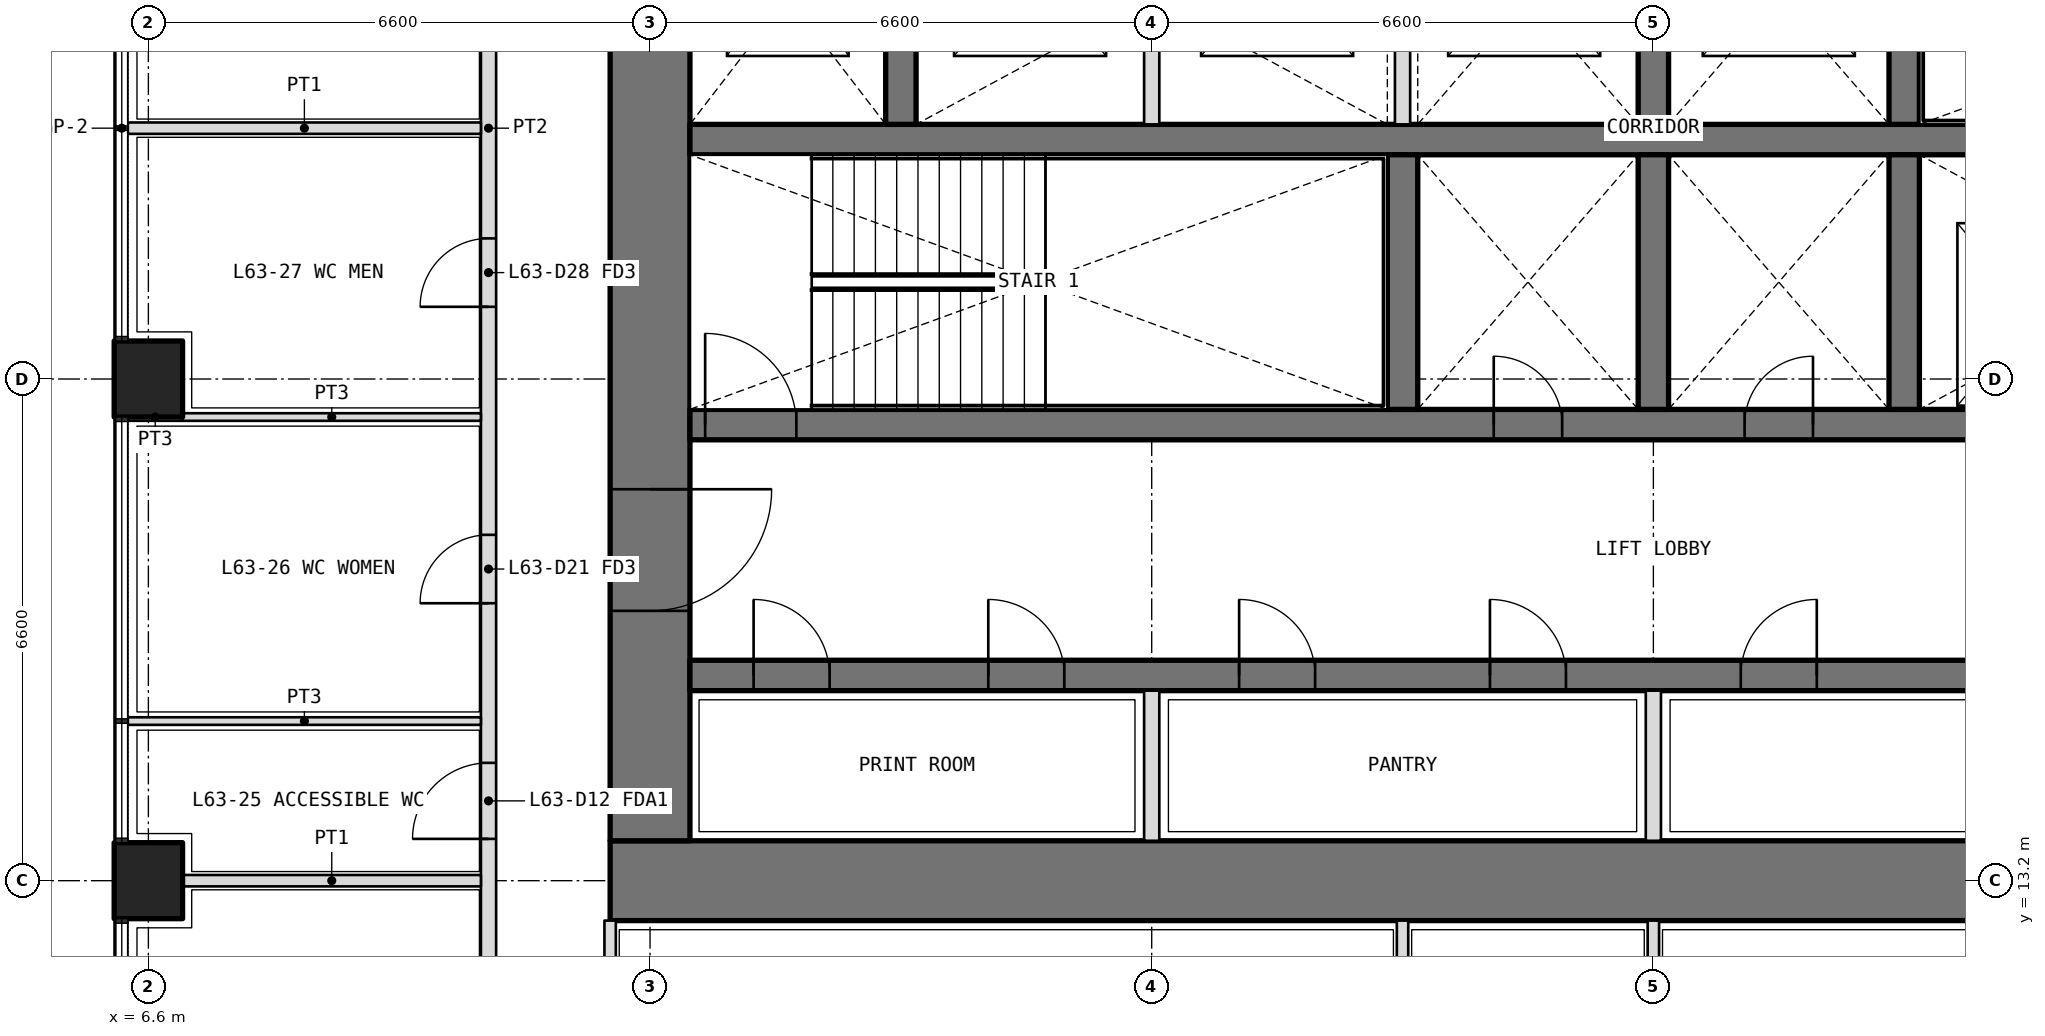
"""IFC4 building model, lengths in metres.
Left out: names, types, materials, properties, quantities, classifications, styles, units other than length and angle.
Written with IfcOpenShell. Run it as: python <this file> out.ifc"""

import sys

from ifc_helpers import new_model, si_unit, direction, frame, frame_2d, origin, origin_2d, place, context, subcontext, project, spatial, rectangle, extrude, element, fill, save


model = new_model("IFC4")
c1 = context("Model", 3, precision=1e-05, world=origin(), true_north=direction((0.0, 1.0)))
c2 = subcontext(c1, "Body", "Model", "MODEL_VIEW")
j1 = project(units=[si_unit("LENGTHUNIT", "METRE"), si_unit("PLANEANGLEUNIT", "RADIAN")], contexts=[c1])
p1 = place(None, origin())
s1 = spatial("IfcSite", under=j1, at=p1, CompositionType="ELEMENT")
p2 = place(p1, origin())
s2 = spatial("IfcBuilding", under=s1, at=p2, CompositionType="ELEMENT")
p3 = place(p2, frame((0.0, 0.0, 275.4)))
s3 = spatial("IfcBuildingStorey", under=s2, at=p3, CompositionType="ELEMENT", Elevation=275.4)
for number, where, z_axis, x_axis in (
    (1, (6.6, 13.2, 0.0), (0.0, 0.0, 1.0), (0.0, 1.0, 0.0)),
    (2, (6.6, 19.8, 0.0), (0.0, 0.0, 1.0), (0.0, 1.0, 0.0)),
):
    element("IfcColumn", number, at=place(p3, frame(where, z_axis=z_axis, x_axis=x_axis)), inside=s3, PredefinedType="COLUMN", context=c2, shape_type="SweptSolid", body=[
        extrude(rectangle(XDim=1.0, YDim=0.9, at=origin_2d()), origin(), (0.0, 0.0, 1.0), 4.2),
    ])
p4 = place(p3, frame((12.675, 13.2, 0.0), z_axis=(0.0, 0.0, 1.0), x_axis=(1.0, 0.0, 0.0)))
e3 = element("IfcWall", 3, at=p4, inside=s3, PredefinedType="SHEAR", context=c2, shape_type="SweptSolid", body=[
    extrude(rectangle(XDim=27.45, YDim=1.05, at=frame_2d((13.725, 0.0))), origin(), (0.0, 0.0, 1.0), 4.2),
])
p5 = place(p3, frame((13.2, 32.475, 0.0), z_axis=(0.0, 0.0, 1.0), x_axis=(0.0, -1.0, 0.0)))
e4 = element("IfcWall", 4, at=p5, inside=s3, PredefinedType="SHEAR", context=c2, shape_type="SweptSolid", body=[
    extrude(rectangle(XDim=18.75, YDim=1.05, at=frame_2d((9.375, 0.0))), origin(), (0.0, 0.0, 1.0), 4.2),
])
p6 = place(p5, frame((14.125, 0.0, 0.0)))
e5 = element("IfcOpeningElement", 5, at=p6, cuts=e4, PredefinedType="OPENING", context=c2, shape_type="SweptSolid", body=[
    extrude(rectangle(XDim=1.6, YDim=2.1, at=frame_2d((0.8, 1.05))), frame((0.0, 0.535, 0.0), z_axis=(0.0, -1.0, 0.0), x_axis=(1.0, 0.0, 0.0)), (0.0, 0.0, 1.0), 1.07),
])
p7 = place(p5, frame((3.325, 0.0, 0.0)))
e6 = element("IfcOpeningElement", 6, at=p7, cuts=e4, PredefinedType="OPENING", context=c2, shape_type="SweptSolid", body=[
    extrude(rectangle(XDim=1.6, YDim=2.1, at=frame_2d((0.8, 1.05))), frame((0.0, 0.535, 0.0), z_axis=(0.0, -1.0, 0.0), x_axis=(1.0, 0.0, 0.0)), (0.0, 0.0, 1.0), 1.07),
])
p8 = place(p3, frame((13.725, 15.9, 0.0), z_axis=(0.0, 0.0, 1.0), x_axis=(1.0, 0.0, 0.0)))
e7 = element("IfcWall", 7, at=p8, inside=s3, PredefinedType="SHEAR", context=c2, shape_type="SweptSolid", body=[
    extrude(rectangle(XDim=25.35, YDim=0.4, at=frame_2d((12.675, 0.0))), origin(), (0.0, 0.0, 1.0), 4.2),
])
p9 = place(p8, frame((0.837, 0.0, 0.0)))
e8 = element("IfcOpeningElement", 8, at=p9, cuts=e7, PredefinedType="OPENING", context=c2, shape_type="SweptSolid", body=[
    extrude(rectangle(XDim=1.0, YDim=2.1, at=frame_2d((0.5, 1.05))), frame((0.0, 0.21, 0.0), z_axis=(0.0, -1.0, 0.0), x_axis=(1.0, 0.0, 0.0)), (0.0, 0.0, 1.0), 0.42),
])
p10 = place(p8, frame((3.925, 0.0, 0.0)))
e9 = element("IfcOpeningElement", 9, at=p10, cuts=e7, PredefinedType="OPENING", context=c2, shape_type="SweptSolid", body=[
    extrude(rectangle(XDim=1.0, YDim=2.1, at=frame_2d((0.5, 1.05))), frame((0.0, 0.21, 0.0), z_axis=(0.0, -1.0, 0.0), x_axis=(1.0, 0.0, 0.0)), (0.0, 0.0, 1.0), 0.42),
])
p11 = place(p8, frame((7.225, 0.0, 0.0)))
e10 = element("IfcOpeningElement", 10, at=p11, cuts=e7, PredefinedType="OPENING", context=c2, shape_type="SweptSolid", body=[
    extrude(rectangle(XDim=1.0, YDim=2.1, at=frame_2d((0.5, 1.05))), frame((0.0, 0.21, 0.0), z_axis=(0.0, -1.0, 0.0), x_axis=(1.0, 0.0, 0.0)), (0.0, 0.0, 1.0), 0.42),
])
p12 = place(p8, frame((10.525, 0.0, 0.0)))
e11 = element("IfcOpeningElement", 11, at=p12, cuts=e7, PredefinedType="OPENING", context=c2, shape_type="SweptSolid", body=[
    extrude(rectangle(XDim=1.0, YDim=2.1, at=frame_2d((0.5, 1.05))), frame((0.0, 0.21, 0.0), z_axis=(0.0, -1.0, 0.0), x_axis=(1.0, 0.0, 0.0)), (0.0, 0.0, 1.0), 0.42),
])
p13 = place(p8, frame((13.825, 0.0, 0.0)))
e12 = element("IfcOpeningElement", 12, at=p13, cuts=e7, PredefinedType="OPENING", context=c2, shape_type="SweptSolid", body=[
    extrude(rectangle(XDim=1.0, YDim=2.1, at=frame_2d((0.5, 1.05))), frame((0.0, 0.21, 0.0), z_axis=(0.0, -1.0, 0.0), x_axis=(1.0, 0.0, 0.0)), (0.0, 0.0, 1.0), 0.42),
])
p14 = place(p8, frame((17.125, 0.0, 0.0)))
e13 = element("IfcOpeningElement", 13, at=p14, cuts=e7, PredefinedType="OPENING", context=c2, shape_type="SweptSolid", body=[
    extrude(rectangle(XDim=1.0, YDim=2.1, at=frame_2d((0.5, 1.05))), frame((0.0, 0.21, 0.0), z_axis=(0.0, -1.0, 0.0), x_axis=(1.0, 0.0, 0.0)), (0.0, 0.0, 1.0), 0.42),
])
p15 = place(p8, frame((20.425, 0.0, 0.0)))
e14 = element("IfcOpeningElement", 14, at=p15, cuts=e7, PredefinedType="OPENING", context=c2, shape_type="SweptSolid", body=[
    extrude(rectangle(XDim=1.0, YDim=2.1, at=frame_2d((0.5, 1.05))), frame((0.0, 0.21, 0.0), z_axis=(0.0, -1.0, 0.0), x_axis=(1.0, 0.0, 0.0)), (0.0, 0.0, 1.0), 0.42),
])
p16 = place(p8, frame((23.512, 0.0, 0.0)))
e15 = element("IfcOpeningElement", 15, at=p16, cuts=e7, PredefinedType="OPENING", context=c2, shape_type="SweptSolid", body=[
    extrude(rectangle(XDim=1.0, YDim=2.1, at=frame_2d((0.5, 1.05))), frame((0.0, 0.21, 0.0), z_axis=(0.0, -1.0, 0.0), x_axis=(1.0, 0.0, 0.0)), (0.0, 0.0, 1.0), 0.42),
])
p17 = place(p3, frame((13.725, 19.2, 0.0), z_axis=(0.0, 0.0, 1.0), x_axis=(1.0, 0.0, 0.0)))
e16 = element("IfcWall", 16, at=p17, inside=s3, PredefinedType="SHEAR", context=c2, shape_type="SweptSolid", body=[
    extrude(rectangle(XDim=25.35, YDim=0.4, at=frame_2d((12.675, 0.0))), origin(), (0.0, 0.0, 1.0), 4.2),
])
p18 = place(p17, frame((10.575, 0.0, 0.0)))
e17 = element("IfcOpeningElement", 17, at=p18, cuts=e16, PredefinedType="OPENING", context=c2, shape_type="SweptSolid", body=[
    extrude(rectangle(XDim=0.9, YDim=2.1, at=frame_2d((0.45, 1.05))), frame((0.0, 0.21, 0.0), z_axis=(0.0, -1.0, 0.0), x_axis=(1.0, 0.0, 0.0)), (0.0, 0.0, 1.0), 0.42),
])
p19 = place(p17, frame((13.875, 0.0, 0.0)))
e18 = element("IfcOpeningElement", 18, at=p19, cuts=e16, PredefinedType="OPENING", context=c2, shape_type="SweptSolid", body=[
    extrude(rectangle(XDim=0.9, YDim=2.1, at=frame_2d((0.45, 1.05))), frame((0.0, 0.21, 0.0), z_axis=(0.0, -1.0, 0.0), x_axis=(1.0, 0.0, 0.0)), (0.0, 0.0, 1.0), 0.42),
])
p20 = place(p17, frame((0.2, 0.0, 0.0)))
e19 = element("IfcOpeningElement", 19, at=p20, cuts=e16, PredefinedType="OPENING", context=c2, shape_type="SweptSolid", body=[
    extrude(rectangle(XDim=1.2, YDim=2.1, at=frame_2d((0.6, 1.05))), frame((0.0, 0.21, 0.0), z_axis=(0.0, -1.0, 0.0), x_axis=(1.0, 0.0, 0.0)), (0.0, 0.0, 1.0), 0.42),
])
p21 = place(p17, frame((23.512, 0.0, 0.0)))
e20 = element("IfcOpeningElement", 20, at=p21, cuts=e16, PredefinedType="OPENING", context=c2, shape_type="SweptSolid", body=[
    extrude(rectangle(XDim=1.1, YDim=2.1, at=frame_2d((0.55, 1.05))), frame((0.0, 0.21, 0.0), z_axis=(0.0, -1.0, 0.0), x_axis=(1.0, 0.0, 0.0)), (0.0, 0.0, 1.0), 0.42),
])
p22 = place(p17, frame((17.125, 0.0, 0.0)))
e21 = element("IfcOpeningElement", 21, at=p22, cuts=e16, PredefinedType="OPENING", context=c2, shape_type="SweptSolid", body=[
    extrude(rectangle(XDim=1.1, YDim=2.1, at=frame_2d((0.55, 1.05))), frame((0.0, 0.21, 0.0), z_axis=(0.0, -1.0, 0.0), x_axis=(1.0, 0.0, 0.0)), (0.0, 0.0, 1.0), 0.42),
])
p23 = place(p17, frame((20.325, 0.0, 0.0)))
e22 = element("IfcOpeningElement", 22, at=p23, cuts=e16, PredefinedType="OPENING", context=c2, shape_type="SweptSolid", body=[
    extrude(rectangle(XDim=1.1, YDim=2.1, at=frame_2d((0.55, 1.05))), frame((0.0, 0.21, 0.0), z_axis=(0.0, -1.0, 0.0), x_axis=(1.0, 0.0, 0.0)), (0.0, 0.0, 1.0), 0.42),
])
p24 = place(p3, frame((13.725, 22.95, 0.0), z_axis=(0.0, 0.0, 1.0), x_axis=(1.0, 0.0, 0.0)))
e23 = element("IfcWall", 23, at=p24, inside=s3, PredefinedType="SHEAR", context=c2, shape_type="SweptSolid", body=[
    extrude(rectangle(XDim=25.35, YDim=0.4, at=frame_2d((12.675, 0.0))), origin(), (0.0, 0.0, 1.0), 4.2),
])
for number, where, z_axis, x_axis in (
    (24, (23.1, 19.4, 0.0), (0.0, 0.0, 1.0), (0.0, 1.0, 0.0)),
    (25, (26.4, 19.4, 0.0), (0.0, 0.0, 1.0), (0.0, 1.0, 0.0)),
    (26, (29.7, 19.4, 0.0), (0.0, 0.0, 1.0), (0.0, 1.0, 0.0)),
    (27, (16.5, 23.15, 0.0), (0.0, 0.0, 1.0), (0.0, 1.0, 0.0)),
    (28, (26.4, 23.15, 0.0), (0.0, 0.0, 1.0), (0.0, 1.0, 0.0)),
    (29, (29.7, 23.15, 0.0), (0.0, 0.0, 1.0), (0.0, 1.0, 0.0)),
):
    element("IfcWall", number, at=place(p3, frame(where, z_axis=z_axis, x_axis=x_axis)), inside=s3, PredefinedType="SHEAR", context=c2, shape_type="SweptSolid", body=[
        extrude(rectangle(XDim=3.35, YDim=0.4, at=frame_2d((1.675, 0.0))), origin(), (0.0, 0.0, 1.0), 4.2),
    ])
for number, where, z_axis, x_axis in (
    (30, (19.8, 13.725, 0.0), (0.0, 0.0, 1.0), (0.0, 1.0, 0.0)),
    (31, (26.4, 13.725, 0.0), (0.0, 0.0, 1.0), (0.0, 1.0, 0.0)),
):
    element("IfcWall", number, at=place(p3, frame(where, z_axis=z_axis, x_axis=x_axis)), inside=s3, PredefinedType="PARTITIONING", context=c2, shape_type="SweptSolid", body=[
        extrude(rectangle(XDim=1.975, YDim=0.2, at=frame_2d((0.987, 0.0))), origin(), (0.0, 0.0, 1.0), 4.2),
    ])
for number, where, z_axis, x_axis in (
    (32, (19.8, 23.15, 0.0), (0.0, 0.0, 1.0), (0.0, 1.0, 0.0)),
    (33, (23.1, 23.15, 0.0), (0.0, 0.0, 1.0), (0.0, 1.0, 0.0)),
):
    element("IfcWall", number, at=place(p3, frame(where, z_axis=z_axis, x_axis=x_axis)), inside=s3, PredefinedType="PARTITIONING", context=c2, shape_type="SweptSolid", body=[
        extrude(rectangle(XDim=3.35, YDim=0.2, at=frame_2d((1.675, 0.0))), origin(), (0.0, 0.0, 1.0), 4.2),
    ])
p25 = place(p3, frame((12.675, 12.675, 0.0), z_axis=(0.0, 0.0, 1.0), x_axis=(0.0, -1.0, 0.0)))
e34 = element("IfcWall", 34, at=p25, inside=s3, PredefinedType="PARTITIONING", context=c2, shape_type="SweptSolid", body=[
    extrude(rectangle(XDim=3.675, YDim=0.15, at=frame_2d((1.837, 0.0))), origin(), (0.0, 0.0, 1.0), 3.0),
])
p26 = place(p3, frame((23.1, 12.675, 0.0), z_axis=(0.0, 0.0, 1.0), x_axis=(0.0, -1.0, 0.0)))
e35 = element("IfcWall", 35, at=p26, inside=s3, PredefinedType="PARTITIONING", context=c2, shape_type="SweptSolid", body=[
    extrude(rectangle(XDim=3.675, YDim=0.15, at=frame_2d((1.837, 0.0))), origin(), (0.0, 0.0, 1.0), 3.9),
])
p27 = place(p3, frame((26.4, 12.675, 0.0), z_axis=(0.0, 0.0, 1.0), x_axis=(0.0, -1.0, 0.0)))
e36 = element("IfcWall", 36, at=p27, inside=s3, PredefinedType="PARTITIONING", context=c2, shape_type="SweptSolid", body=[
    extrude(rectangle(XDim=3.675, YDim=0.15, at=frame_2d((1.837, 0.0))), origin(), (0.0, 0.0, 1.0), 3.0),
])
p28 = place(p3, frame((11.075, 7.4, 0.0), z_axis=(0.0, 0.0, 1.0), x_axis=(0.0, 1.0, 0.0)))
e37 = element("IfcWall", 37, at=p28, inside=s3, PredefinedType="PARTITIONING", context=c2, shape_type="SweptSolid", body=[
    extrude(rectangle(XDim=31.4, YDim=0.2, at=frame_2d((15.7, 0.0))), origin(), (0.0, 0.0, 1.0), 3.0),
])
p29 = place(p28, frame((2.35, 0.0, 0.0)))
e38 = element("IfcOpeningElement", 38, at=p29, cuts=e37, PredefinedType="OPENING", context=c2, shape_type="SweptSolid", body=[
    extrude(rectangle(XDim=1.0, YDim=2.1, at=frame_2d((0.5, 1.05))), frame((0.0, 0.11, 0.0), z_axis=(0.0, -1.0, 0.0), x_axis=(1.0, 0.0, 0.0)), (0.0, 0.0, 1.0), 0.22),
])
p30 = place(p28, frame((6.35, 0.0, 0.0)))
e39 = element("IfcOpeningElement", 39, at=p30, cuts=e37, PredefinedType="OPENING", context=c2, shape_type="SweptSolid", body=[
    extrude(rectangle(XDim=1.0, YDim=2.1, at=frame_2d((0.5, 1.05))), frame((0.0, 0.11, 0.0), z_axis=(0.0, -1.0, 0.0), x_axis=(1.0, 0.0, 0.0)), (0.0, 0.0, 1.0), 0.22),
])
p31 = place(p28, frame((9.45, 0.0, 0.0)))
e40 = element("IfcOpeningElement", 40, at=p31, cuts=e37, PredefinedType="OPENING", context=c2, shape_type="SweptSolid", body=[
    extrude(rectangle(XDim=0.9, YDim=2.1, at=frame_2d((0.45, 1.05))), frame((0.0, 0.11, 0.0), z_axis=(0.0, -1.0, 0.0), x_axis=(1.0, 0.0, 0.0)), (0.0, 0.0, 1.0), 0.22),
])
p32 = place(p28, frame((13.35, 0.0, 0.0)))
e41 = element("IfcOpeningElement", 41, at=p32, cuts=e37, PredefinedType="OPENING", context=c2, shape_type="SweptSolid", body=[
    extrude(rectangle(XDim=0.9, YDim=2.1, at=frame_2d((0.45, 1.05))), frame((0.0, 0.11, 0.0), z_axis=(0.0, -1.0, 0.0), x_axis=(1.0, 0.0, 0.0)), (0.0, 0.0, 1.0), 0.22),
])
p33 = place(p28, frame((23.1, 0.0, 0.0)))
e42 = element("IfcOpeningElement", 42, at=p33, cuts=e37, PredefinedType="OPENING", context=c2, shape_type="SweptSolid", body=[
    extrude(rectangle(XDim=1.0, YDim=2.1, at=frame_2d((0.5, 1.05))), frame((0.0, 0.11, 0.0), z_axis=(0.0, -1.0, 0.0), x_axis=(1.0, 0.0, 0.0)), (0.0, 0.0, 1.0), 0.22),
])
p34 = place(p3, frame((6.33, 15.3, 0.0), z_axis=(0.0, 0.0, 1.0), x_axis=(1.0, 0.0, 0.0)))
e43 = element("IfcWall", 43, at=p34, inside=s3, PredefinedType="PARTITIONING", context=c2, shape_type="SweptSolid", body=[
    extrude(rectangle(XDim=4.645, YDim=0.1, at=frame_2d((2.323, 0.0))), origin(), (0.0, 0.0, 1.0), 2.7),
])
p35 = place(p3, frame((6.33, 19.3, 0.0), z_axis=(0.0, 0.0, 1.0), x_axis=(1.0, 0.0, 0.0)))
e44 = element("IfcWall", 44, at=p35, inside=s3, PredefinedType="PARTITIONING", context=c2, shape_type="SweptSolid", body=[
    extrude(rectangle(XDim=0.72, YDim=0.1, at=frame_2d((0.36, 0.0))), origin(), (0.0, 0.0, 1.0), 2.7),
])
p36 = place(p3, frame((7.05, 19.3, 0.0), z_axis=(0.0, 0.0, 1.0), x_axis=(1.0, 0.0, 0.0)))
e45 = element("IfcWall", 45, at=p36, inside=s3, PredefinedType="PARTITIONING", context=c2, shape_type="SweptSolid", body=[
    extrude(rectangle(XDim=3.925, YDim=0.1, at=frame_2d((1.962, 0.0))), origin(), (0.0, 0.0, 1.0), 3.0),
])
p37 = place(p3, frame((6.33, 23.1, 0.0), z_axis=(0.0, 0.0, 1.0), x_axis=(1.0, 0.0, 0.0)))
e46 = element("IfcWall", 46, at=p37, inside=s3, PredefinedType="PARTITIONING", context=c2, shape_type="SweptSolid", body=[
    extrude(rectangle(XDim=4.645, YDim=0.15, at=frame_2d((2.323, 0.0))), origin(), (0.0, 0.0, 1.0), 2.7),
])
p38 = place(p3, frame((7.05, 13.2, 0.0), z_axis=(0.0, 0.0, 1.0), x_axis=(1.0, 0.0, 0.0)))
e47 = element("IfcWall", 47, at=p38, inside=s3, PredefinedType="PARTITIONING", context=c2, shape_type="SweptSolid", body=[
    extrude(rectangle(XDim=3.925, YDim=0.15, at=frame_2d((1.962, 0.0))), origin(), (0.0, 0.0, 1.0), 3.0),
])
p39 = place(p30, origin())
e48 = element("IfcDoor", 48, at=p39, inside=s3, OperationType="SINGLE_SWING_LEFT", PredefinedType="DOOR", context=c2, shape_type="SweptSolid", body=[
    extrude(rectangle(XDim=1.0, YDim=2.1, at=frame_2d((0.5, 1.05))), frame((0.0, 0.025, 0.0), z_axis=(0.0, -1.0, 0.0), x_axis=(1.0, 0.0, 0.0)), (0.0, 0.0, 1.0), 0.05),
])
fill(e39, e48)
p40 = place(p31, origin())
e49 = element("IfcDoor", 49, at=p40, inside=s3, OperationType="SINGLE_SWING_LEFT", PredefinedType="DOOR", context=c2, shape_type="SweptSolid", body=[
    extrude(rectangle(XDim=0.9, YDim=2.1, at=frame_2d((0.45, 1.05))), frame((0.0, 0.025, 0.0), z_axis=(0.0, -1.0, 0.0), x_axis=(1.0, 0.0, 0.0)), (0.0, 0.0, 1.0), 0.05),
])
fill(e40, e49)
p41 = place(p32, origin())
e50 = element("IfcDoor", 50, at=p41, inside=s3, OperationType="SINGLE_SWING_LEFT", PredefinedType="DOOR", context=c2, shape_type="SweptSolid", body=[
    extrude(rectangle(XDim=0.9, YDim=2.1, at=frame_2d((0.45, 1.05))), frame((0.0, 0.025, 0.0), z_axis=(0.0, -1.0, 0.0), x_axis=(1.0, 0.0, 0.0)), (0.0, 0.0, 1.0), 0.05),
])
fill(e41, e50)
p42 = place(p18, origin())
e51 = element("IfcDoor", 51, at=p42, inside=s3, OperationType="SINGLE_SWING_LEFT", PredefinedType="DOOR", context=c2, shape_type="SweptSolid", body=[
    extrude(rectangle(XDim=0.9, YDim=2.1, at=frame_2d((0.45, 1.05))), frame((0.0, 0.025, 0.0), z_axis=(0.0, -1.0, 0.0), x_axis=(1.0, 0.0, 0.0)), (0.0, 0.0, 1.0), 0.05),
])
fill(e17, e51)
p43 = place(p19, origin())
e52 = element("IfcDoor", 52, at=p43, inside=s3, OperationType="SINGLE_SWING_RIGHT", PredefinedType="DOOR", context=c2, shape_type="SweptSolid", body=[
    extrude(rectangle(XDim=0.9, YDim=2.1, at=frame_2d((0.45, 1.05))), frame((0.0, 0.025, 0.0), z_axis=(0.0, -1.0, 0.0), x_axis=(1.0, 0.0, 0.0)), (0.0, 0.0, 1.0), 0.05),
])
fill(e18, e52)
p44 = place(p9, origin())
e53 = element("IfcDoor", 53, at=p44, inside=s3, OperationType="SINGLE_SWING_LEFT", PredefinedType="DOOR", context=c2, shape_type="SweptSolid", body=[
    extrude(rectangle(XDim=1.0, YDim=2.1, at=frame_2d((0.5, 1.05))), frame((0.0, 0.025, 0.0), z_axis=(0.0, -1.0, 0.0), x_axis=(1.0, 0.0, 0.0)), (0.0, 0.0, 1.0), 0.05),
])
fill(e8, e53)
p45 = place(p10, origin())
e54 = element("IfcDoor", 54, at=p45, inside=s3, OperationType="SINGLE_SWING_LEFT", PredefinedType="DOOR", context=c2, shape_type="SweptSolid", body=[
    extrude(rectangle(XDim=1.0, YDim=2.1, at=frame_2d((0.5, 1.05))), frame((0.0, 0.025, 0.0), z_axis=(0.0, -1.0, 0.0), x_axis=(1.0, 0.0, 0.0)), (0.0, 0.0, 1.0), 0.05),
])
fill(e9, e54)
p46 = place(p11, origin())
e55 = element("IfcDoor", 55, at=p46, inside=s3, OperationType="SINGLE_SWING_LEFT", PredefinedType="DOOR", context=c2, shape_type="SweptSolid", body=[
    extrude(rectangle(XDim=1.0, YDim=2.1, at=frame_2d((0.5, 1.05))), frame((0.0, 0.025, 0.0), z_axis=(0.0, -1.0, 0.0), x_axis=(1.0, 0.0, 0.0)), (0.0, 0.0, 1.0), 0.05),
])
fill(e10, e55)
p47 = place(p12, origin())
e56 = element("IfcDoor", 56, at=p47, inside=s3, OperationType="SINGLE_SWING_LEFT", PredefinedType="DOOR", context=c2, shape_type="SweptSolid", body=[
    extrude(rectangle(XDim=1.0, YDim=2.1, at=frame_2d((0.5, 1.05))), frame((0.0, 0.025, 0.0), z_axis=(0.0, -1.0, 0.0), x_axis=(1.0, 0.0, 0.0)), (0.0, 0.0, 1.0), 0.05),
])
fill(e11, e56)
p48 = place(p13, origin())
e57 = element("IfcDoor", 57, at=p48, inside=s3, OperationType="SINGLE_SWING_RIGHT", PredefinedType="DOOR", context=c2, shape_type="SweptSolid", body=[
    extrude(rectangle(XDim=1.0, YDim=2.1, at=frame_2d((0.5, 1.05))), frame((0.0, 0.025, 0.0), z_axis=(0.0, -1.0, 0.0), x_axis=(1.0, 0.0, 0.0)), (0.0, 0.0, 1.0), 0.05),
])
fill(e12, e57)
p49 = place(p20, origin())
e58 = element("IfcDoor", 58, at=p49, inside=s3, OperationType="SINGLE_SWING_LEFT", PredefinedType="DOOR", context=c2, shape_type="SweptSolid", body=[
    extrude(rectangle(XDim=1.2, YDim=2.1, at=frame_2d((0.6, 1.05))), frame((0.0, 0.025, 0.0), z_axis=(0.0, -1.0, 0.0), x_axis=(1.0, 0.0, 0.0)), (0.0, 0.0, 1.0), 0.05),
])
fill(e19, e58)
p50 = place(p6, origin())
e59 = element("IfcDoor", 59, at=p50, inside=s3, OperationType="DOUBLE_DOOR_DOUBLE_SWING", PredefinedType="DOOR", context=c2, shape_type="SweptSolid", body=[
    extrude(rectangle(XDim=1.6, YDim=2.1, at=frame_2d((0.8, 1.05))), frame((0.0, 0.025, 0.0), z_axis=(0.0, -1.0, 0.0), x_axis=(1.0, 0.0, 0.0)), (0.0, 0.0, 1.0), 0.05),
])
fill(e5, e59)
save(model, sys.argv[1])
